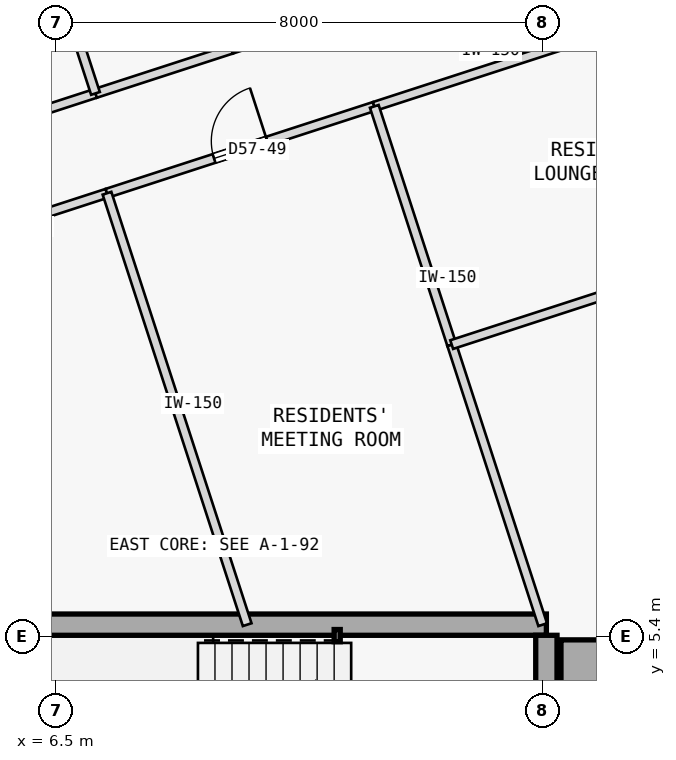
"""IFC4 building model, lengths in metres.
Left out: names, types, materials, properties, quantities, classifications, styles, units other than length and angle.
Written with IfcOpenShell. Run it as: python <this file> out.ifc"""

import sys

from ifc_helpers import new_model, si_unit, direction, frame, frame_2d, origin, origin_2d, place, context, subcontext, project, spatial, rectangle, hollow_rectangle, extrude, element, fill, save


model = new_model("IFC4")
c1 = context("Model", 3, precision=1e-05, world=origin(), true_north=direction((0.0, 1.0)))
c2 = subcontext(c1, "Body", "Model", "MODEL_VIEW")
j1 = project(units=[si_unit("LENGTHUNIT", "METRE"), si_unit("PLANEANGLEUNIT", "RADIAN")], contexts=[c1])
p1 = place(None, origin())
s1 = spatial("IfcSite", under=j1, at=p1, CompositionType="ELEMENT")
p2 = place(p1, origin())
s2 = spatial("IfcBuilding", under=s1, at=p2, CompositionType="ELEMENT")
p3 = place(p2, frame((0.0, 0.0, 217.6)))
s3 = spatial("IfcBuildingStorey", under=s2, at=p3, CompositionType="ELEMENT", Elevation=217.6)
p4 = place(p3, frame((15.25, 4.9, 0.0), z_axis=(0.0, 0.0, 1.0), x_axis=(1.0, 0.0, 0.0)))
e1 = element("IfcColumn", 1, at=p4, inside=s3, PredefinedType="COLUMN", context=c2, shape_type="SweptSolid", body=[
    extrude(rectangle(XDim=0.9, YDim=0.9, at=origin_2d()), origin(), (0.0, 0.0, 1.0), 3.35),
])
p5 = place(p3, frame((3.15, 5.6, 0.0), z_axis=(0.0, 0.0, 1.0), x_axis=(1.0, 0.0, 0.0)))
e2 = element("IfcWall", 2, at=p5, inside=s3, PredefinedType="SHEAR", context=c2, shape_type="SweptSolid", body=[
    extrude(rectangle(XDim=11.41, YDim=0.35, at=frame_2d((5.705, 0.0))), origin(), (0.0, 0.0, 1.0), 3.125),
])
p6 = place(p3, frame((14.56, -5.425, 0.0), z_axis=(0.0, 0.0, 1.0), x_axis=(0.0, 1.0, 0.0)))
e3 = element("IfcWall", 3, at=p6, inside=s3, PredefinedType="SHEAR", context=c2, shape_type="SweptSolid", body=[
    extrude(rectangle(XDim=10.85, YDim=0.35, at=frame_2d((5.425, 0.0))), origin(), (0.0, 0.0, 1.0), 3.125),
])
p7 = place(p3, frame((11.12, 5.42, 0.0), z_axis=(0.0, 0.0, 1.0), x_axis=(1.0, 0.0, 0.0)))
e4 = element("IfcColumn", 4, at=p7, inside=s3, PredefinedType="COLUMN", context=c2, shape_type="SweptSolid", body=[
    extrude(hollow_rectangle(XDim=0.1, YDim=0.2, WallThickness=0.008, at=origin_2d()), origin(), (0.0, 0.0, 1.0), 3.35),
])
p8 = place(p3, frame((2.719, 12.898, 0.0), z_axis=(0.0, 0.0, 1.0), x_axis=(0.951053341802, 0.309026764289, 0.0)))
e5 = element("IfcWall", 5, at=p8, inside=s3, PredefinedType="PARTITIONING", context=c2, shape_type="SweptSolid", body=[
    extrude(rectangle(XDim=4.654, YDim=0.15, at=frame_2d((2.327, 0.0))), origin(), (0.0, 0.0, 1.0), 3.125),
])
p9 = place(p3, frame((7.145, 14.337, 0.0), z_axis=(0.0, 0.0, 1.0), x_axis=(0.951045519245, 0.309050837767, 0.0)))
e6 = element("IfcWall", 6, at=p9, inside=s3, PredefinedType="PARTITIONING", context=c2, shape_type="SweptSolid", body=[
    extrude(rectangle(XDim=2.35, YDim=0.15, at=frame_2d((1.175, 0.0))), origin(), (0.0, 0.0, 1.0), 3.125),
])
p10 = place(p3, frame((9.38, 15.063, 0.0), z_axis=(0.0, 0.0, 1.0), x_axis=(0.951069122051, 0.308978195154, 0.0)))
e7 = element("IfcWall", 7, at=p10, inside=s3, PredefinedType="PARTITIONING", context=c2, shape_type="SweptSolid", body=[
    extrude(rectangle(XDim=4.35, YDim=0.15, at=frame_2d((2.175, 0.0))), origin(), (0.0, 0.0, 1.0), 3.125),
])
p11 = place(p3, frame((4.013, 11.616, 0.0), z_axis=(0.0, 0.0, 1.0), x_axis=(0.951054104561, 0.309024416831, 0.0)))
e8 = element("IfcWall", 8, at=p11, inside=s3, PredefinedType="PARTITIONING", context=c2, shape_type="SweptSolid", body=[
    extrude(rectangle(XDim=3.492, YDim=0.15, at=frame_2d((1.746, 0.0))), origin(), (0.0, 0.0, 1.0), 3.125),
])
p12 = place(p11, frame((1.286, 0.0, 0.0)))
e9 = element("IfcOpeningElement", 9, at=p12, cuts=e8, PredefinedType="OPENING", context=c2, shape_type="SweptSolid", body=[
    extrude(rectangle(XDim=0.92, YDim=2.15, at=frame_2d((0.46, 1.075))), frame((0.0, 0.085, 0.0), z_axis=(0.0, -1.0, 0.0), x_axis=(1.0, 0.0, 0.0)), (0.0, 0.0, 1.0), 0.17),
])
p13 = place(p3, frame((7.334, 12.695, 0.0), z_axis=(0.0, 0.0, 1.0), x_axis=(0.951043772533, 0.30905621289, 0.0)))
e10 = element("IfcWall", 10, at=p13, inside=s3, PredefinedType="PARTITIONING", context=c2, shape_type="SweptSolid", body=[
    extrude(rectangle(XDim=4.622, YDim=0.15, at=frame_2d((2.311, 0.0))), origin(), (0.0, 0.0, 1.0), 3.125),
])
p14 = place(p13, frame((1.851, 0.0, 0.0)))
e11 = element("IfcOpeningElement", 11, at=p14, cuts=e10, PredefinedType="OPENING", context=c2, shape_type="SweptSolid", body=[
    extrude(rectangle(XDim=0.92, YDim=2.15, at=frame_2d((0.46, 1.075))), frame((0.0, 0.085, 0.0), z_axis=(0.0, -1.0, 0.0), x_axis=(1.0, 0.0, 0.0)), (0.0, 0.0, 1.0), 0.17),
])
p15 = place(p3, frame((11.73, 14.123, 0.0), z_axis=(0.0, 0.0, 1.0), x_axis=(0.951060263663, 0.309005460926, 0.0)))
e12 = element("IfcWall", 12, at=p15, inside=s3, PredefinedType="PARTITIONING", context=c2, shape_type="SweptSolid", body=[
    extrude(rectangle(XDim=12.327, YDim=0.15, at=frame_2d((6.164, 0.0))), origin(), (0.0, 0.0, 1.0), 3.125),
])
p16 = place(p15, frame((5.704, 0.0, 0.0)))
e13 = element("IfcOpeningElement", 13, at=p16, cuts=e12, PredefinedType="OPENING", context=c2, shape_type="SweptSolid", body=[
    extrude(rectangle(XDim=0.92, YDim=2.15, at=frame_2d((0.46, 1.075))), frame((0.0, 0.085, 0.0), z_axis=(0.0, -1.0, 0.0), x_axis=(1.0, 0.0, 0.0)), (0.0, 0.0, 1.0), 0.17),
])
p17 = place(p3, frame((7.145, 14.337, 0.0), z_axis=(0.0, 0.0, 1.0), x_axis=(-0.308948390121, 0.951078804433, 0.0)))
e14 = element("IfcWall", 14, at=p17, inside=s3, PredefinedType="PARTITIONING", context=c2, shape_type="SweptSolid", body=[
    extrude(rectangle(XDim=2.005, YDim=0.15, at=frame_2d((1.002, 0.0))), origin(), (0.0, 0.0, 1.0), 3.125),
])
p18 = place(p3, frame((9.64, 5.6, 0.0), z_axis=(0.0, 0.0, 1.0), x_axis=(-0.309012069377, 0.95105811651, 0.0)))
e15 = element("IfcWall", 15, at=p18, inside=s3, PredefinedType="PARTITIONING", context=c2, shape_type="SweptSolid", body=[
    extrude(rectangle(XDim=7.46, YDim=0.15, at=frame_2d((3.73, 0.0))), origin(), (0.0, 0.0, 1.0), 3.125),
])
p19 = place(p3, frame((14.5, 5.6, 0.0), z_axis=(0.0, 0.0, 1.0), x_axis=(-0.308974360462, 0.951070367837, 0.0)))
e16 = element("IfcWall", 16, at=p19, inside=s3, PredefinedType="PARTITIONING", context=c2, shape_type="SweptSolid", body=[
    extrude(rectangle(XDim=4.843, YDim=0.15, at=frame_2d((2.421, 0.0))), origin(), (0.0, 0.0, 1.0), 3.125),
])
p20 = place(p3, frame((13.003, 10.206, 0.0), z_axis=(0.0, 0.0, 1.0), x_axis=(-0.309035144366, 0.951050618814, 0.0)))
e17 = element("IfcWall", 17, at=p20, inside=s3, PredefinedType="PARTITIONING", context=c2, shape_type="SweptSolid", body=[
    extrude(rectangle(XDim=4.119, YDim=0.15, at=frame_2d((2.06, 0.0))), origin(), (0.0, 0.0, 1.0), 3.125),
])
p21 = place(p3, frame((15.064, 3.863, 0.0), z_axis=(0.0, 0.0, 1.0), x_axis=(0.951061448945, 0.309001812827, 0.0)))
e18 = element("IfcWall", 18, at=p21, inside=s3, PredefinedType="PARTITIONING", context=c2, shape_type="SweptSolid", body=[
    extrude(rectangle(XDim=10.352, YDim=0.15, at=frame_2d((5.176, 0.0))), origin(), (0.0, 0.0, 1.0), 3.125),
])
p22 = place(p21, frame((4.716, 0.0, 0.0)))
e19 = element("IfcOpeningElement", 19, at=p22, cuts=e18, PredefinedType="OPENING", context=c2, shape_type="SweptSolid", body=[
    extrude(rectangle(XDim=0.92, YDim=2.15, at=frame_2d((0.46, 1.075))), frame((0.0, 0.085, 0.0), z_axis=(0.0, -1.0, 0.0), x_axis=(1.0, 0.0, 0.0)), (0.0, 0.0, 1.0), 0.17),
])
p23 = place(p3, frame((13.003, 10.206, 0.0), z_axis=(0.0, 0.0, 1.0), x_axis=(0.951060263663, 0.309005460926, 0.0)))
e20 = element("IfcWall", 20, at=p23, inside=s3, PredefinedType="PARTITIONING", context=c2, shape_type="SweptSolid", body=[
    extrude(rectangle(XDim=12.327, YDim=0.15, at=frame_2d((6.164, 0.0))), origin(), (0.0, 0.0, 1.0), 2.675),
])
p24 = place(p14, origin())
e21 = element("IfcDoor", 21, at=p24, inside=s3, OperationType="SINGLE_SWING_RIGHT", PredefinedType="DOOR", context=c2, shape_type="SweptSolid", body=[
    extrude(rectangle(XDim=0.92, YDim=2.15, at=frame_2d((0.46, 1.075))), frame((0.0, 0.025, 0.0), z_axis=(0.0, -1.0, 0.0), x_axis=(1.0, 0.0, 0.0)), (0.0, 0.0, 1.0), 0.05),
])
fill(e11, e21)
save(model, sys.argv[1])
